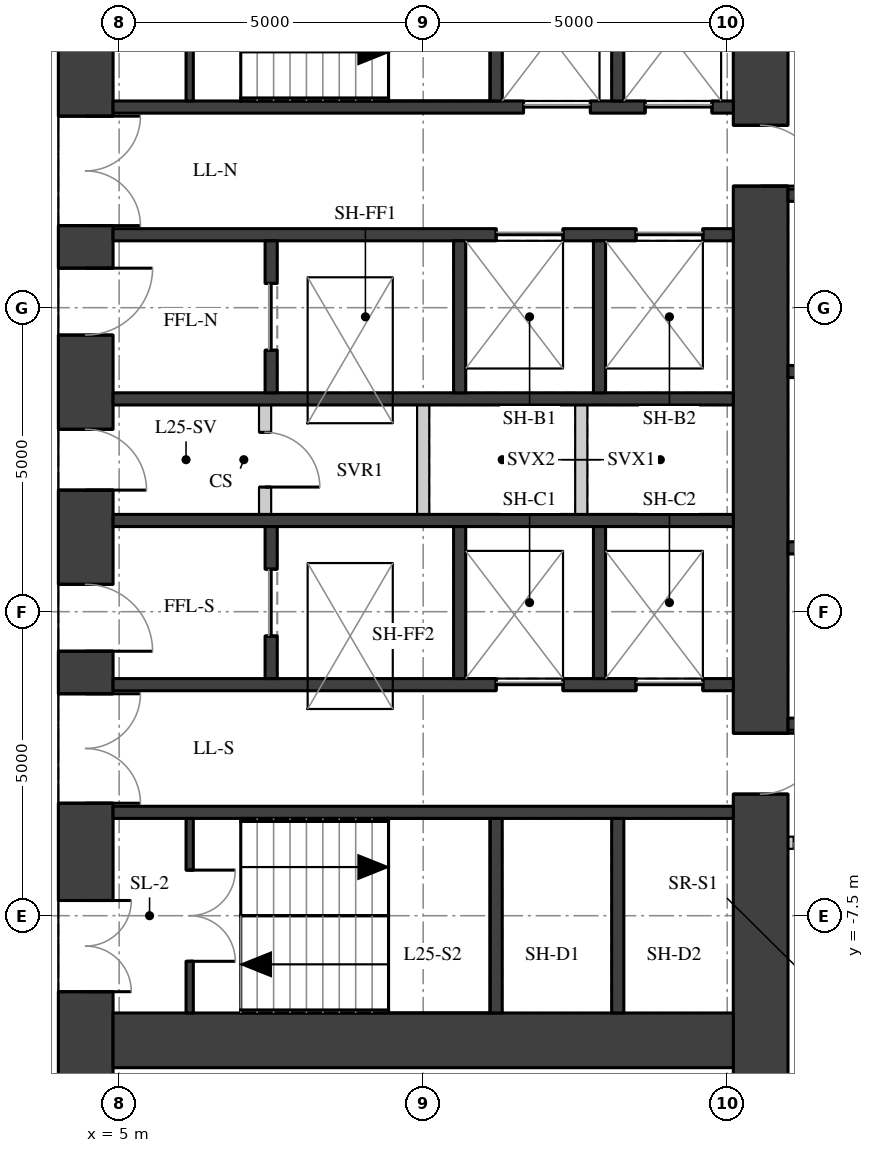
"""IFC4 building model, lengths in metres.
Left out: names, types, materials, properties, quantities, classifications, styles, units other than length and angle.
Written with IfcOpenShell. Run it as: python <this file> out.ifc"""

import sys

from ifc_helpers import new_model, si_unit, direction, frame, frame_2d, origin, place, context, subcontext, project, spatial, rectangle, extrude, element, fill, save


model = new_model("IFC4")
c1 = context("Model", 3, precision=1e-05, world=origin(), true_north=direction((0.0, 1.0)))
c2 = subcontext(c1, "Body", "Model", "MODEL_VIEW")
j1 = project(units=[si_unit("LENGTHUNIT", "METRE"), si_unit("PLANEANGLEUNIT", "RADIAN")], contexts=[c1])
p1 = place(None, origin())
s1 = spatial("IfcSite", under=j1, at=p1, CompositionType="ELEMENT")
p2 = place(p1, origin())
s2 = spatial("IfcBuilding", under=s1, at=p2, CompositionType="ELEMENT")
p3 = place(p2, frame((0.0, 0.0, 92.2)))
s3 = spatial("IfcBuildingStorey", under=s2, at=p3, CompositionType="ELEMENT", Elevation=92.2)
p4 = place(p3, frame((4.45, -11.1, 0.0), z_axis=(0.0, 0.0, 1.0), x_axis=(0.0, 1.0, 0.0)))
e1 = element("IfcWall", 1, at=p4, inside=s3, PredefinedType="SHEAR", context=c2, shape_type="SweptSolid", body=[
    extrude(rectangle(XDim=22.2, YDim=0.9, at=frame_2d((11.1, 0.0))), origin(), (0.0, 0.0, 1.0), 3.02),
])
p5 = place(p4, frame((2.35, 0.0, 0.0)))
e2 = element("IfcOpeningElement", 2, at=p5, cuts=e1, PredefinedType="OPENING", context=c2, shape_type="SweptSolid", body=[
    extrude(rectangle(XDim=1.5, YDim=2.1, at=frame_2d((0.75, 1.05))), frame((0.0, 0.46, 0.0), z_axis=(0.0, -1.0, 0.0), x_axis=(1.0, 0.0, 0.0)), (0.0, 0.0, 1.0), 0.92),
])
p6 = place(p4, frame((5.45, 0.0, 0.0)))
e3 = element("IfcOpeningElement", 3, at=p6, cuts=e1, PredefinedType="OPENING", context=c2, shape_type="SweptSolid", body=[
    extrude(rectangle(XDim=1.8, YDim=2.1, at=frame_2d((0.9, 1.05))), frame((0.0, 0.46, 0.0), z_axis=(0.0, -1.0, 0.0), x_axis=(1.0, 0.0, 0.0)), (0.0, 0.0, 1.0), 0.92),
])
p7 = place(p4, frame((7.95, 0.0, 0.0)))
e4 = element("IfcOpeningElement", 4, at=p7, cuts=e1, PredefinedType="OPENING", context=c2, shape_type="SweptSolid", body=[
    extrude(rectangle(XDim=1.1, YDim=2.1, at=frame_2d((0.55, 1.05))), frame((0.0, 0.46, 0.0), z_axis=(0.0, -1.0, 0.0), x_axis=(1.0, 0.0, 0.0)), (0.0, 0.0, 1.0), 0.92),
])
p8 = place(p4, frame((10.6, 0.0, 0.0)))
e5 = element("IfcOpeningElement", 5, at=p8, cuts=e1, PredefinedType="OPENING", context=c2, shape_type="SweptSolid", body=[
    extrude(rectangle(XDim=1.0, YDim=2.1, at=frame_2d((0.5, 1.05))), frame((0.0, 0.46, 0.0), z_axis=(0.0, -1.0, 0.0), x_axis=(1.0, 0.0, 0.0)), (0.0, 0.0, 1.0), 0.92),
])
p9 = place(p4, frame((13.15, 0.0, 0.0)))
e6 = element("IfcOpeningElement", 6, at=p9, cuts=e1, PredefinedType="OPENING", context=c2, shape_type="SweptSolid", body=[
    extrude(rectangle(XDim=1.1, YDim=2.1, at=frame_2d((0.55, 1.05))), frame((0.0, 0.46, 0.0), z_axis=(0.0, -1.0, 0.0), x_axis=(1.0, 0.0, 0.0)), (0.0, 0.0, 1.0), 0.92),
])
p10 = place(p4, frame((14.95, 0.0, 0.0)))
e7 = element("IfcOpeningElement", 7, at=p10, cuts=e1, PredefinedType="OPENING", context=c2, shape_type="SweptSolid", body=[
    extrude(rectangle(XDim=1.8, YDim=2.1, at=frame_2d((0.9, 1.05))), frame((0.0, 0.46, 0.0), z_axis=(0.0, -1.0, 0.0), x_axis=(1.0, 0.0, 0.0)), (0.0, 0.0, 1.0), 0.92),
])
p11 = place(p4, frame((18.35, 0.0, 0.0)))
e8 = element("IfcOpeningElement", 8, at=p11, cuts=e1, PredefinedType="OPENING", context=c2, shape_type="SweptSolid", body=[
    extrude(rectangle(XDim=1.5, YDim=2.1, at=frame_2d((0.75, 1.05))), frame((0.0, 0.46, 0.0), z_axis=(0.0, -1.0, 0.0), x_axis=(1.0, 0.0, 0.0)), (0.0, 0.0, 1.0), 0.92),
])
p12 = place(p3, frame((15.55, -11.1, 0.0), z_axis=(0.0, 0.0, 1.0), x_axis=(0.0, 1.0, 0.0)))
e9 = element("IfcWall", 9, at=p12, inside=s3, PredefinedType="SHEAR", context=c2, shape_type="SweptSolid", body=[
    extrude(rectangle(XDim=22.2, YDim=0.9, at=frame_2d((11.1, 0.0))), origin(), (0.0, 0.0, 1.0), 3.02),
])
p13 = place(p12, frame((15.6, 0.0, 0.0)))
e10 = element("IfcOpeningElement", 10, at=p13, cuts=e9, PredefinedType="OPENING", context=c2, shape_type="SweptSolid", body=[
    extrude(rectangle(XDim=1.0, YDim=2.1, at=frame_2d((0.5, 1.05))), frame((0.0, 0.46, 0.0), z_axis=(0.0, -1.0, 0.0), x_axis=(1.0, 0.0, 0.0)), (0.0, 0.0, 1.0), 0.92),
])
p14 = place(p12, frame((5.6, 0.0, 0.0)))
e11 = element("IfcOpeningElement", 11, at=p14, cuts=e9, PredefinedType="OPENING", context=c2, shape_type="SweptSolid", body=[
    extrude(rectangle(XDim=1.0, YDim=2.1, at=frame_2d((0.5, 1.05))), frame((0.0, 0.46, 0.0), z_axis=(0.0, -1.0, 0.0), x_axis=(1.0, 0.0, 0.0)), (0.0, 0.0, 1.0), 0.92),
])
p15 = place(p3, frame((4.9, -9.55, 0.0), z_axis=(0.0, 0.0, 1.0), x_axis=(1.0, 0.0, 0.0)))
e12 = element("IfcWall", 12, at=p15, inside=s3, PredefinedType="SHEAR", context=c2, shape_type="SweptSolid", body=[
    extrude(rectangle(XDim=10.2, YDim=0.9, at=frame_2d((5.1, 0.0))), origin(), (0.0, 0.0, 1.0), 3.02),
])
p16 = place(p3, frame((4.9, 5.8, 0.0), z_axis=(0.0, 0.0, 1.0), x_axis=(1.0, 0.0, 0.0)))
e13 = element("IfcWall", 13, at=p16, inside=s3, PredefinedType="SHEAR", context=c2, shape_type="SweptSolid", body=[
    extrude(rectangle(XDim=10.2, YDim=0.2, at=frame_2d((5.1, 0.0))), origin(), (0.0, 0.0, 1.0), 3.02),
])
p17 = place(p16, frame((6.75, 0.0, 0.0)))
e14 = element("IfcOpeningElement", 14, at=p17, cuts=e13, PredefinedType="OPENING", context=c2, shape_type="SweptSolid", body=[
    extrude(rectangle(XDim=1.1, YDim=2.1, at=frame_2d((0.55, 1.05))), frame((0.0, 0.11, 0.0), z_axis=(0.0, -1.0, 0.0), x_axis=(1.0, 0.0, 0.0)), (0.0, 0.0, 1.0), 0.22),
])
p18 = place(p16, frame((8.75, 0.0, 0.0)))
e15 = element("IfcOpeningElement", 15, at=p18, cuts=e13, PredefinedType="OPENING", context=c2, shape_type="SweptSolid", body=[
    extrude(rectangle(XDim=1.1, YDim=2.1, at=frame_2d((0.55, 1.05))), frame((0.0, 0.11, 0.0), z_axis=(0.0, -1.0, 0.0), x_axis=(1.0, 0.0, 0.0)), (0.0, 0.0, 1.0), 0.22),
])
p19 = place(p3, frame((4.9, 3.7, 0.0), z_axis=(0.0, 0.0, 1.0), x_axis=(1.0, 0.0, 0.0)))
e16 = element("IfcWall", 16, at=p19, inside=s3, PredefinedType="SHEAR", context=c2, shape_type="SweptSolid", body=[
    extrude(rectangle(XDim=10.2, YDim=0.2, at=frame_2d((5.1, 0.0))), origin(), (0.0, 0.0, 1.0), 3.02),
])
p20 = place(p19, frame((6.3, 0.0, 0.0)))
e17 = element("IfcOpeningElement", 17, at=p20, cuts=e16, PredefinedType="OPENING", context=c2, shape_type="SweptSolid", body=[
    extrude(rectangle(XDim=1.1, YDim=2.1, at=frame_2d((0.55, 1.05))), frame((0.0, 0.11, 0.0), z_axis=(0.0, -1.0, 0.0), x_axis=(1.0, 0.0, 0.0)), (0.0, 0.0, 1.0), 0.22),
])
p21 = place(p19, frame((8.6, 0.0, 0.0)))
e18 = element("IfcOpeningElement", 18, at=p21, cuts=e16, PredefinedType="OPENING", context=c2, shape_type="SweptSolid", body=[
    extrude(rectangle(XDim=1.1, YDim=2.1, at=frame_2d((0.55, 1.05))), frame((0.0, 0.11, 0.0), z_axis=(0.0, -1.0, 0.0), x_axis=(1.0, 0.0, 0.0)), (0.0, 0.0, 1.0), 0.22),
])
for number, where, z_axis, x_axis in (
    (19, (4.9, 1.0, 0.0), (0.0, 0.0, 1.0), (1.0, 0.0, 0.0)),
    (20, (4.9, -1.0, 0.0), (0.0, 0.0, 1.0), (1.0, 0.0, 0.0)),
):
    element("IfcWall", number, at=place(p3, frame(where, z_axis=z_axis, x_axis=x_axis)), inside=s3, PredefinedType="SHEAR", context=c2, shape_type="SweptSolid", body=[
        extrude(rectangle(XDim=10.2, YDim=0.2, at=frame_2d((5.1, 0.0))), origin(), (0.0, 0.0, 1.0), 3.02),
    ])
p22 = place(p3, frame((4.9, -3.7, 0.0), z_axis=(0.0, 0.0, 1.0), x_axis=(1.0, 0.0, 0.0)))
e21 = element("IfcWall", 21, at=p22, inside=s3, PredefinedType="SHEAR", context=c2, shape_type="SweptSolid", body=[
    extrude(rectangle(XDim=10.2, YDim=0.2, at=frame_2d((5.1, 0.0))), origin(), (0.0, 0.0, 1.0), 3.02),
])
p23 = place(p22, frame((6.3, 0.0, 0.0)))
e22 = element("IfcOpeningElement", 22, at=p23, cuts=e21, PredefinedType="OPENING", context=c2, shape_type="SweptSolid", body=[
    extrude(rectangle(XDim=1.1, YDim=2.1, at=frame_2d((0.55, 1.05))), frame((0.0, 0.11, 0.0), z_axis=(0.0, -1.0, 0.0), x_axis=(1.0, 0.0, 0.0)), (0.0, 0.0, 1.0), 0.22),
])
p24 = place(p22, frame((8.6, 0.0, 0.0)))
e23 = element("IfcOpeningElement", 23, at=p24, cuts=e21, PredefinedType="OPENING", context=c2, shape_type="SweptSolid", body=[
    extrude(rectangle(XDim=1.1, YDim=2.1, at=frame_2d((0.55, 1.05))), frame((0.0, 0.11, 0.0), z_axis=(0.0, -1.0, 0.0), x_axis=(1.0, 0.0, 0.0)), (0.0, 0.0, 1.0), 0.22),
])
p25 = place(p3, frame((4.9, -5.8, 0.0), z_axis=(0.0, 0.0, 1.0), x_axis=(1.0, 0.0, 0.0)))
e24 = element("IfcWall", 24, at=p25, inside=s3, PredefinedType="SHEAR", context=c2, shape_type="SweptSolid", body=[
    extrude(rectangle(XDim=10.2, YDim=0.2, at=frame_2d((5.1, 0.0))), origin(), (0.0, 0.0, 1.0), 3.02),
])
for number, where, z_axis, x_axis in (
    (25, (11.2, 5.9, 0.0), (0.0, 0.0, 1.0), (0.0, 1.0, 0.0)),
    (26, (11.2, -9.1, 0.0), (0.0, 0.0, 1.0), (0.0, 1.0, 0.0)),
    (27, (13.2, 5.9, 0.0), (0.0, 0.0, 1.0), (0.0, 1.0, 0.0)),
    (28, (13.2, -9.1, 0.0), (0.0, 0.0, 1.0), (0.0, 1.0, 0.0)),
):
    element("IfcWall", number, at=place(p3, frame(where, z_axis=z_axis, x_axis=x_axis)), inside=s3, PredefinedType="SHEAR", context=c2, shape_type="SweptSolid", body=[
        extrude(rectangle(XDim=3.2, YDim=0.2, at=frame_2d((1.6, 0.0))), origin(), (0.0, 0.0, 1.0), 3.02),
    ])
p26 = place(p3, frame((7.5, 1.1, 0.0), z_axis=(0.0, 0.0, 1.0), x_axis=(0.0, 1.0, 0.0)))
e29 = element("IfcWall", 29, at=p26, inside=s3, PredefinedType="SHEAR", context=c2, shape_type="SweptSolid", body=[
    extrude(rectangle(XDim=2.5, YDim=0.2, at=frame_2d((1.25, 0.0))), origin(), (0.0, 0.0, 1.0), 3.02),
])
p27 = place(p26, frame((0.7, 0.0, 0.0)))
e30 = element("IfcOpeningElement", 30, at=p27, cuts=e29, PredefinedType="OPENING", context=c2, shape_type="SweptSolid", body=[
    extrude(rectangle(XDim=1.1, YDim=2.1, at=frame_2d((0.55, 1.05))), frame((0.0, 0.11, 0.0), z_axis=(0.0, -1.0, 0.0), x_axis=(1.0, 0.0, 0.0)), (0.0, 0.0, 1.0), 0.22),
])
p28 = place(p3, frame((7.5, -3.6, 0.0), z_axis=(0.0, 0.0, 1.0), x_axis=(0.0, 1.0, 0.0)))
e31 = element("IfcWall", 31, at=p28, inside=s3, PredefinedType="SHEAR", context=c2, shape_type="SweptSolid", body=[
    extrude(rectangle(XDim=2.5, YDim=0.2, at=frame_2d((1.25, 0.0))), origin(), (0.0, 0.0, 1.0), 3.02),
])
p29 = place(p28, frame((0.7, 0.0, 0.0)))
e32 = element("IfcOpeningElement", 32, at=p29, cuts=e31, PredefinedType="OPENING", context=c2, shape_type="SweptSolid", body=[
    extrude(rectangle(XDim=1.1, YDim=2.1, at=frame_2d((0.55, 1.05))), frame((0.0, 0.11, 0.0), z_axis=(0.0, -1.0, 0.0), x_axis=(1.0, 0.0, 0.0)), (0.0, 0.0, 1.0), 0.22),
])
for number, where, z_axis, x_axis in (
    (33, (10.6, 1.1, 0.0), (0.0, 0.0, 1.0), (0.0, 1.0, 0.0)),
    (34, (10.6, -3.6, 0.0), (0.0, 0.0, 1.0), (0.0, 1.0, 0.0)),
    (35, (12.9, 1.1, 0.0), (0.0, 0.0, 1.0), (0.0, 1.0, 0.0)),
    (36, (12.9, -3.6, 0.0), (0.0, 0.0, 1.0), (0.0, 1.0, 0.0)),
):
    element("IfcWall", number, at=place(p3, frame(where, z_axis=z_axis, x_axis=x_axis)), inside=s3, PredefinedType="SHEAR", context=c2, shape_type="SweptSolid", body=[
        extrude(rectangle(XDim=2.5, YDim=0.2, at=frame_2d((1.25, 0.0))), origin(), (0.0, 0.0, 1.0), 3.02),
    ])
p30 = place(p3, frame((6.16, 5.9, 0.0), z_axis=(0.0, 0.0, 1.0), x_axis=(0.0, 1.0, 0.0)))
e37 = element("IfcWall", 37, at=p30, inside=s3, PredefinedType="SHEAR", context=c2, shape_type="SweptSolid", body=[
    extrude(rectangle(XDim=3.2, YDim=0.12, at=frame_2d((1.6, 0.0))), origin(), (0.0, 0.0, 1.0), 3.02),
])
p31 = place(p30, frame((0.85, 0.0, 0.0)))
e38 = element("IfcOpeningElement", 38, at=p31, cuts=e37, PredefinedType="OPENING", context=c2, shape_type="SweptSolid", body=[
    extrude(rectangle(XDim=1.5, YDim=2.1, at=frame_2d((0.75, 1.05))), frame((0.0, 0.07, 0.0), z_axis=(0.0, -1.0, 0.0), x_axis=(1.0, 0.0, 0.0)), (0.0, 0.0, 1.0), 0.14),
])
p32 = place(p3, frame((6.16, -9.1, 0.0), z_axis=(0.0, 0.0, 1.0), x_axis=(0.0, 1.0, 0.0)))
e39 = element("IfcWall", 39, at=p32, inside=s3, PredefinedType="SHEAR", context=c2, shape_type="SweptSolid", body=[
    extrude(rectangle(XDim=3.2, YDim=0.12, at=frame_2d((1.6, 0.0))), origin(), (0.0, 0.0, 1.0), 3.02),
])
p33 = place(p32, frame((0.85, 0.0, 0.0)))
e40 = element("IfcOpeningElement", 40, at=p33, cuts=e39, PredefinedType="OPENING", context=c2, shape_type="SweptSolid", body=[
    extrude(rectangle(XDim=1.5, YDim=2.1, at=frame_2d((0.75, 1.05))), frame((0.0, 0.07, 0.0), z_axis=(0.0, -1.0, 0.0), x_axis=(1.0, 0.0, 0.0)), (0.0, 0.0, 1.0), 0.14),
])
p34 = place(p3, frame((7.4, -0.9, 0.0), z_axis=(0.0, 0.0, 1.0), x_axis=(0.0, 1.0, 0.0)))
e41 = element("IfcWall", 41, at=p34, inside=s3, PredefinedType="PARTITIONING", context=c2, shape_type="SweptSolid", body=[
    extrude(rectangle(XDim=1.8, YDim=0.2, at=frame_2d((0.9, 0.0))), origin(), (0.0, 0.0, 1.0), 3.02),
])
p35 = place(p34, frame((0.45, 0.0, 0.0)))
e42 = element("IfcOpeningElement", 42, at=p35, cuts=e41, PredefinedType="OPENING", context=c2, shape_type="SweptSolid", body=[
    extrude(rectangle(XDim=0.9, YDim=2.1, at=frame_2d((0.45, 1.05))), frame((0.0, 0.11, 0.0), z_axis=(0.0, -1.0, 0.0), x_axis=(1.0, 0.0, 0.0)), (0.0, 0.0, 1.0), 0.22),
])
for number, where, z_axis, x_axis in (
    (43, (10.0, -0.9, 0.0), (0.0, 0.0, 1.0), (0.0, 1.0, 0.0)),
    (44, (12.6, -0.9, 0.0), (0.0, 0.0, 1.0), (0.0, 1.0, 0.0)),
):
    element("IfcWall", number, at=place(p3, frame(where, z_axis=z_axis, x_axis=x_axis)), inside=s3, PredefinedType="PARTITIONING", context=c2, shape_type="SweptSolid", body=[
        extrude(rectangle(XDim=1.8, YDim=0.2, at=frame_2d((0.9, 0.0))), origin(), (0.0, 0.0, 1.0), 3.02),
    ])
for number, where, z_axis, x_axis in (
    (45, (16.0, -4.35, 0.0), (0.0, 0.0, 1.0), (1.0, 0.0, 0.0)),
    (46, (16.0, -1.45, 0.0), (0.0, 0.0, 1.0), (1.0, 0.0, 0.0)),
    (47, (16.0, 1.45, 0.0), (0.0, 0.0, 1.0), (1.0, 0.0, 0.0)),
    (48, (16.0, 4.35, 0.0), (0.0, 0.0, 1.0), (1.0, 0.0, 0.0)),
):
    element("IfcWall", number, at=place(p3, frame(where, z_axis=z_axis, x_axis=x_axis)), inside=s3, PredefinedType="SHEAR", context=c2, shape_type="SweptSolid", body=[
        extrude(rectangle(XDim=2.3, YDim=0.2, at=frame_2d((1.15, 0.0))), origin(), (0.0, 0.0, 1.0), 3.02),
    ])
p36 = place(p3, frame((16.0, -6.3, 0.0), z_axis=(0.0, 0.0, 1.0), x_axis=(1.0, 0.0, 0.0)))
e49 = element("IfcWall", 49, at=p36, inside=s3, PredefinedType="PARTITIONING", context=c2, shape_type="SweptSolid", body=[
    extrude(rectangle(XDim=2.3, YDim=0.2, at=frame_2d((1.15, 0.0))), origin(), (0.0, 0.0, 1.0), 3.02),
])
p37 = place(p36, frame((0.1, 0.0, 0.0)))
e50 = element("IfcOpeningElement", 50, at=p37, cuts=e49, PredefinedType="OPENING", context=c2, shape_type="SweptSolid", body=[
    extrude(rectangle(XDim=0.9, YDim=2.1, at=frame_2d((0.45, 1.05))), frame((0.0, 0.11, 0.0), z_axis=(0.0, -1.0, 0.0), x_axis=(1.0, 0.0, 0.0)), (0.0, 0.0, 1.0), 0.22),
])
p38 = place(p5, origin())
e51 = element("IfcDoor", 51, at=p38, inside=s3, OperationType="DOUBLE_DOOR_SINGLE_SWING", PredefinedType="DOOR", context=c2, shape_type="SweptSolid", body=[
    extrude(rectangle(XDim=1.5, YDim=2.1, at=frame_2d((0.75, 1.05))), frame((0.0, 0.025, 0.0), z_axis=(0.0, -1.0, 0.0), x_axis=(1.0, 0.0, 0.0)), (0.0, 0.0, 1.0), 0.05),
])
fill(e2, e51)
p39 = place(p6, origin())
e52 = element("IfcDoor", 52, at=p39, inside=s3, OperationType="DOUBLE_DOOR_SINGLE_SWING", PredefinedType="DOOR", context=c2, shape_type="SweptSolid", body=[
    extrude(rectangle(XDim=1.8, YDim=2.1, at=frame_2d((0.9, 1.05))), frame((0.0, 0.025, 0.0), z_axis=(0.0, -1.0, 0.0), x_axis=(1.0, 0.0, 0.0)), (0.0, 0.0, 1.0), 0.05),
])
fill(e3, e52)
p40 = place(p7, origin())
e53 = element("IfcDoor", 53, at=p40, inside=s3, OperationType="SINGLE_SWING_RIGHT", PredefinedType="DOOR", context=c2, shape_type="SweptSolid", body=[
    extrude(rectangle(XDim=1.1, YDim=2.1, at=frame_2d((0.55, 1.05))), frame((0.0, 0.025, 0.0), z_axis=(0.0, -1.0, 0.0), x_axis=(1.0, 0.0, 0.0)), (0.0, 0.0, 1.0), 0.05),
])
fill(e4, e53)
p41 = place(p8, origin())
e54 = element("IfcDoor", 54, at=p41, inside=s3, OperationType="SINGLE_SWING_RIGHT", PredefinedType="DOOR", context=c2, shape_type="SweptSolid", body=[
    extrude(rectangle(XDim=1.0, YDim=2.1, at=frame_2d((0.5, 1.05))), frame((0.0, 0.025, 0.0), z_axis=(0.0, -1.0, 0.0), x_axis=(1.0, 0.0, 0.0)), (0.0, 0.0, 1.0), 0.05),
])
fill(e5, e54)
p42 = place(p9, origin())
e55 = element("IfcDoor", 55, at=p42, inside=s3, OperationType="SINGLE_SWING_LEFT", PredefinedType="DOOR", context=c2, shape_type="SweptSolid", body=[
    extrude(rectangle(XDim=1.1, YDim=2.1, at=frame_2d((0.55, 1.05))), frame((0.0, 0.025, 0.0), z_axis=(0.0, -1.0, 0.0), x_axis=(1.0, 0.0, 0.0)), (0.0, 0.0, 1.0), 0.05),
])
fill(e6, e55)
p43 = place(p10, origin())
e56 = element("IfcDoor", 56, at=p43, inside=s3, OperationType="DOUBLE_DOOR_SINGLE_SWING", PredefinedType="DOOR", context=c2, shape_type="SweptSolid", body=[
    extrude(rectangle(XDim=1.8, YDim=2.1, at=frame_2d((0.9, 1.05))), frame((0.0, 0.025, 0.0), z_axis=(0.0, -1.0, 0.0), x_axis=(1.0, 0.0, 0.0)), (0.0, 0.0, 1.0), 0.05),
])
fill(e7, e56)
p44 = place(p33, origin())
e57 = element("IfcDoor", 57, at=p44, inside=s3, OperationType="DOUBLE_DOOR_SINGLE_SWING", PredefinedType="DOOR", context=c2, shape_type="SweptSolid", body=[
    extrude(rectangle(XDim=1.5, YDim=2.1, at=frame_2d((0.75, 1.05))), frame((0.0, 0.025, 0.0), z_axis=(0.0, -1.0, 0.0), x_axis=(1.0, 0.0, 0.0)), (0.0, 0.0, 1.0), 0.05),
])
fill(e40, e57)
p45 = place(p17, origin())
e58 = element("IfcDoor", 58, at=p45, inside=s3, OperationType="DOUBLE_DOOR_SLIDING", PredefinedType="DOOR", context=c2, shape_type="SweptSolid", body=[
    extrude(rectangle(XDim=1.1, YDim=2.1, at=frame_2d((0.55, 1.05))), frame((0.0, 0.025, 0.0), z_axis=(0.0, -1.0, 0.0), x_axis=(1.0, 0.0, 0.0)), (0.0, 0.0, 1.0), 0.05),
])
fill(e14, e58)
p46 = place(p18, origin())
e59 = element("IfcDoor", 59, at=p46, inside=s3, OperationType="DOUBLE_DOOR_SLIDING", PredefinedType="DOOR", context=c2, shape_type="SweptSolid", body=[
    extrude(rectangle(XDim=1.1, YDim=2.1, at=frame_2d((0.55, 1.05))), frame((0.0, 0.025, 0.0), z_axis=(0.0, -1.0, 0.0), x_axis=(1.0, 0.0, 0.0)), (0.0, 0.0, 1.0), 0.05),
])
fill(e15, e59)
p47 = place(p20, origin())
e60 = element("IfcDoor", 60, at=p47, inside=s3, OperationType="DOUBLE_DOOR_SLIDING", PredefinedType="DOOR", context=c2, shape_type="SweptSolid", body=[
    extrude(rectangle(XDim=1.1, YDim=2.1, at=frame_2d((0.55, 1.05))), frame((0.0, 0.025, 0.0), z_axis=(0.0, -1.0, 0.0), x_axis=(1.0, 0.0, 0.0)), (0.0, 0.0, 1.0), 0.05),
])
fill(e17, e60)
p48 = place(p21, origin())
e61 = element("IfcDoor", 61, at=p48, inside=s3, OperationType="DOUBLE_DOOR_SLIDING", PredefinedType="DOOR", context=c2, shape_type="SweptSolid", body=[
    extrude(rectangle(XDim=1.1, YDim=2.1, at=frame_2d((0.55, 1.05))), frame((0.0, 0.025, 0.0), z_axis=(0.0, -1.0, 0.0), x_axis=(1.0, 0.0, 0.0)), (0.0, 0.0, 1.0), 0.05),
])
fill(e18, e61)
p49 = place(p23, origin())
e62 = element("IfcDoor", 62, at=p49, inside=s3, OperationType="DOUBLE_DOOR_SLIDING", PredefinedType="DOOR", context=c2, shape_type="SweptSolid", body=[
    extrude(rectangle(XDim=1.1, YDim=2.1, at=frame_2d((0.55, 1.05))), frame((0.0, 0.025, 0.0), z_axis=(0.0, -1.0, 0.0), x_axis=(1.0, 0.0, 0.0)), (0.0, 0.0, 1.0), 0.05),
])
fill(e22, e62)
p50 = place(p24, origin())
e63 = element("IfcDoor", 63, at=p50, inside=s3, OperationType="DOUBLE_DOOR_SLIDING", PredefinedType="DOOR", context=c2, shape_type="SweptSolid", body=[
    extrude(rectangle(XDim=1.1, YDim=2.1, at=frame_2d((0.55, 1.05))), frame((0.0, 0.025, 0.0), z_axis=(0.0, -1.0, 0.0), x_axis=(1.0, 0.0, 0.0)), (0.0, 0.0, 1.0), 0.05),
])
fill(e23, e63)
p51 = place(p27, origin())
e64 = element("IfcDoor", 64, at=p51, inside=s3, OperationType="DOUBLE_DOOR_SLIDING", PredefinedType="DOOR", context=c2, shape_type="SweptSolid", body=[
    extrude(rectangle(XDim=1.1, YDim=2.1, at=frame_2d((0.55, 1.05))), frame((0.0, 0.025, 0.0), z_axis=(0.0, -1.0, 0.0), x_axis=(1.0, 0.0, 0.0)), (0.0, 0.0, 1.0), 0.05),
])
fill(e30, e64)
p52 = place(p29, origin())
e65 = element("IfcDoor", 65, at=p52, inside=s3, OperationType="DOUBLE_DOOR_SLIDING", PredefinedType="DOOR", context=c2, shape_type="SweptSolid", body=[
    extrude(rectangle(XDim=1.1, YDim=2.1, at=frame_2d((0.55, 1.05))), frame((0.0, 0.025, 0.0), z_axis=(0.0, -1.0, 0.0), x_axis=(1.0, 0.0, 0.0)), (0.0, 0.0, 1.0), 0.05),
])
fill(e32, e65)
p53 = place(p35, origin())
e66 = element("IfcDoor", 66, at=p53, inside=s3, OperationType="SINGLE_SWING_RIGHT", PredefinedType="DOOR", context=c2, shape_type="SweptSolid", body=[
    extrude(rectangle(XDim=0.9, YDim=2.1, at=frame_2d((0.45, 1.05))), frame((0.0, 0.025, 0.0), z_axis=(0.0, -1.0, 0.0), x_axis=(1.0, 0.0, 0.0)), (0.0, 0.0, 1.0), 0.05),
])
fill(e42, e66)
p54 = place(p13, origin())
e67 = element("IfcDoor", 67, at=p54, inside=s3, OperationType="SINGLE_SWING_RIGHT", PredefinedType="DOOR", context=c2, shape_type="SweptSolid", body=[
    extrude(rectangle(XDim=1.0, YDim=2.1, at=frame_2d((0.5, 1.05))), frame((0.0, 0.025, 0.0), z_axis=(0.0, -1.0, 0.0), x_axis=(1.0, 0.0, 0.0)), (0.0, 0.0, 1.0), 0.05),
])
fill(e10, e67)
p55 = place(p14, origin())
e68 = element("IfcDoor", 68, at=p55, inside=s3, OperationType="SINGLE_SWING_LEFT", PredefinedType="DOOR", context=c2, shape_type="SweptSolid", body=[
    extrude(rectangle(XDim=1.0, YDim=2.1, at=frame_2d((0.5, 1.05))), frame((0.0, 0.025, 0.0), z_axis=(0.0, -1.0, 0.0), x_axis=(1.0, 0.0, 0.0)), (0.0, 0.0, 1.0), 0.05),
])
fill(e11, e68)
save(model, sys.argv[1])
